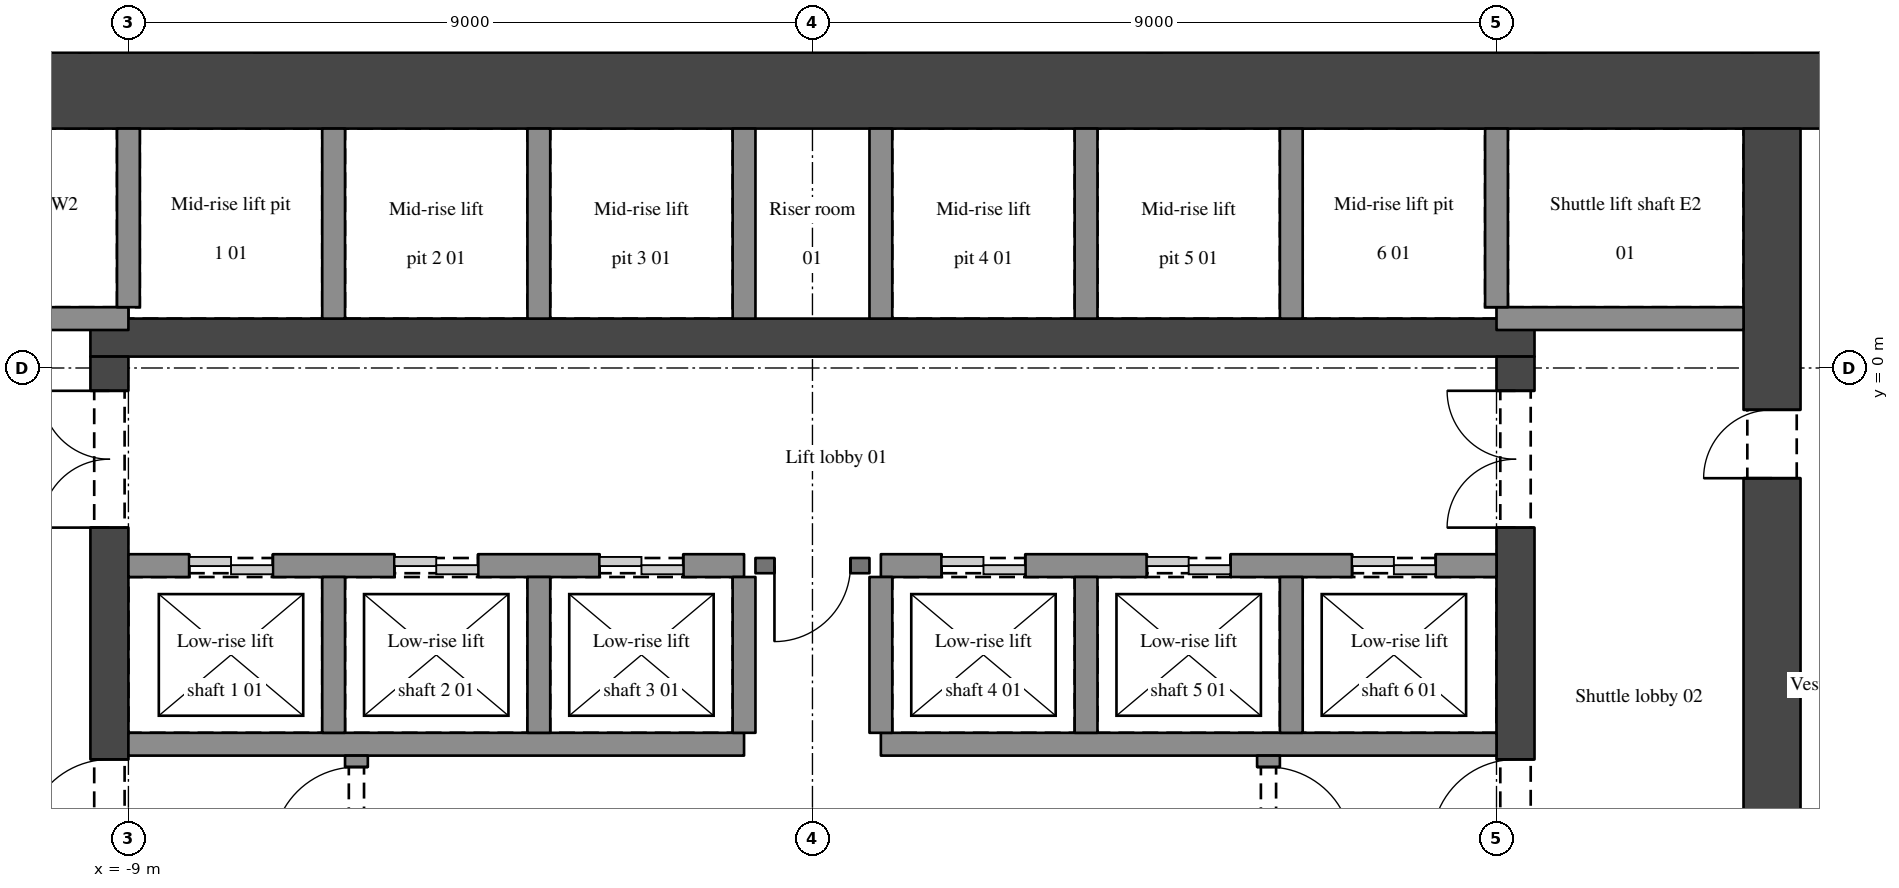
"""IFC4 building model, lengths in metres.
Left out: names, types, materials, properties, quantities, classifications, styles, units other than length and angle.
Written with IfcOpenShell. Run it as: python <this file> out.ifc"""

import sys

from ifc_helpers import new_model, si_unit, direction, frame, frame_2d, origin, place, context, subcontext, project, spatial, rectangle, extrude, element, fill, save


model = new_model("IFC4")
c1 = context("Model", 3, precision=1e-05, world=origin(), true_north=direction((0.0, 1.0)))
c2 = subcontext(c1, "Body", "Model", "MODEL_VIEW")
j1 = project(units=[si_unit("LENGTHUNIT", "METRE"), si_unit("PLANEANGLEUNIT", "RADIAN")], contexts=[c1])
p1 = place(None, origin())
s1 = spatial("IfcSite", under=j1, at=p1, CompositionType="ELEMENT")
p2 = place(p1, origin())
s2 = spatial("IfcBuilding", under=s1, at=p2, CompositionType="ELEMENT")
p3 = place(p2, frame((0.0, 0.0, 105.0)))
s3 = spatial("IfcBuildingStorey", under=s2, at=p3, CompositionType="ELEMENT", Elevation=105.0)
p4 = place(p3, frame((-15.0, 3.65, 0.0), z_axis=(0.0, 0.0, 1.0), x_axis=(1.0, 0.0, 0.0)))
e1 = element("IfcWall", 1, at=p4, inside=s3, PredefinedType="SHEAR", context=c2, shape_type="SweptSolid", body=[
    extrude(rectangle(XDim=30.0, YDim=1.0, at=frame_2d((15.0, 0.0))), origin(), (0.0, 0.0, 1.0), 3.9),
])
p5 = place(p3, frame((12.625, -11.5, 0.0), z_axis=(0.0, 0.0, 1.0), x_axis=(0.0, 1.0, 0.0)))
e2 = element("IfcWall", 2, at=p5, inside=s3, PredefinedType="SHEAR", context=c2, shape_type="SweptSolid", body=[
    extrude(rectangle(XDim=14.65, YDim=0.75, at=frame_2d((7.325, 0.0))), origin(), (0.0, 0.0, 1.0), 3.9),
])
p6 = place(p5, frame((10.05, 0.0, 0.0)))
e3 = element("IfcOpeningElement", 3, at=p6, cuts=e2, PredefinedType="OPENING", context=c2, shape_type="SweptSolid", body=[
    extrude(rectangle(XDim=0.9, YDim=2.1, at=frame_2d((0.45, 1.05))), frame((0.0, 0.385, 0.0), z_axis=(0.0, -1.0, 0.0), x_axis=(1.0, 0.0, 0.0)), (0.0, 0.0, 1.0), 0.77),
])
p7 = place(p3, frame((-9.5, 0.4, 0.0), z_axis=(0.0, 0.0, 1.0), x_axis=(1.0, 0.0, 0.0)))
e4 = element("IfcWall", 4, at=p7, inside=s3, PredefinedType="SHEAR", context=c2, shape_type="SweptSolid", body=[
    extrude(rectangle(XDim=19.0, YDim=0.5, at=frame_2d((9.5, 0.0))), origin(), (0.0, 0.0, 1.0), 3.9),
])
p8 = place(p3, frame((-9.25, -11.5, 0.0), z_axis=(0.0, 0.0, 1.0), x_axis=(0.0, 1.0, 0.0)))
e5 = element("IfcWall", 5, at=p8, inside=s3, PredefinedType="SHEAR", context=c2, shape_type="SweptSolid", body=[
    extrude(rectangle(XDim=11.65, YDim=0.5, at=frame_2d((5.825, 0.0))), origin(), (0.0, 0.0, 1.0), 3.9),
])
p9 = place(p8, frame((9.4, 0.0, 0.0)))
e6 = element("IfcOpeningElement", 6, at=p9, cuts=e5, PredefinedType="OPENING", context=c2, shape_type="SweptSolid", body=[
    extrude(rectangle(XDim=1.8, YDim=2.1, at=frame_2d((0.9, 1.05))), frame((0.0, 0.26, 0.0), z_axis=(0.0, -1.0, 0.0), x_axis=(1.0, 0.0, 0.0)), (0.0, 0.0, 1.0), 0.52),
])
p10 = place(p8, frame((5.25, 0.0, 0.0)))
e7 = element("IfcOpeningElement", 7, at=p10, cuts=e5, PredefinedType="OPENING", context=c2, shape_type="SweptSolid", body=[
    extrude(rectangle(XDim=1.1, YDim=2.1, at=frame_2d((0.55, 1.05))), frame((0.0, 0.26, 0.0), z_axis=(0.0, -1.0, 0.0), x_axis=(1.0, 0.0, 0.0)), (0.0, 0.0, 1.0), 0.52),
])
p11 = place(p3, frame((9.25, -11.5, 0.0), z_axis=(0.0, 0.0, 1.0), x_axis=(0.0, 1.0, 0.0)))
e8 = element("IfcWall", 8, at=p11, inside=s3, PredefinedType="SHEAR", context=c2, shape_type="SweptSolid", body=[
    extrude(rectangle(XDim=11.65, YDim=0.5, at=frame_2d((5.825, 0.0))), origin(), (0.0, 0.0, 1.0), 3.9),
])
p12 = place(p11, frame((9.4, 0.0, 0.0)))
e9 = element("IfcOpeningElement", 9, at=p12, cuts=e8, PredefinedType="OPENING", context=c2, shape_type="SweptSolid", body=[
    extrude(rectangle(XDim=1.8, YDim=2.1, at=frame_2d((0.9, 1.05))), frame((0.0, 0.26, 0.0), z_axis=(0.0, -1.0, 0.0), x_axis=(1.0, 0.0, 0.0)), (0.0, 0.0, 1.0), 0.52),
])
p13 = place(p11, frame((5.25, 0.0, 0.0)))
e10 = element("IfcOpeningElement", 10, at=p13, cuts=e8, PredefinedType="OPENING", context=c2, shape_type="SweptSolid", body=[
    extrude(rectangle(XDim=1.1, YDim=2.1, at=frame_2d((0.55, 1.05))), frame((0.0, 0.26, 0.0), z_axis=(0.0, -1.0, 0.0), x_axis=(1.0, 0.0, 0.0)), (0.0, 0.0, 1.0), 0.52),
])
for number, where, z_axis, x_axis in (
    (11, (-9.0, -4.95, 0.0), (0.0, 0.0, 1.0), (1.0, 0.0, 0.0)),
    (12, (0.9, -4.95, 0.0), (0.0, 0.0, 1.0), (1.0, 0.0, 0.0)),
):
    element("IfcWall", number, at=place(p3, frame(where, z_axis=z_axis, x_axis=x_axis)), inside=s3, PredefinedType="SHEAR", context=c2, shape_type="SweptSolid", body=[
        extrude(rectangle(XDim=8.1, YDim=0.3, at=frame_2d((4.05, 0.0))), origin(), (0.0, 0.0, 1.0), 3.9),
    ])
p14 = place(p3, frame((-9.0, -2.6, 0.0), z_axis=(0.0, 0.0, 1.0), x_axis=(1.0, 0.0, 0.0)))
e13 = element("IfcWall", 13, at=p14, inside=s3, PredefinedType="SHEAR", context=c2, shape_type="SweptSolid", body=[
    extrude(rectangle(XDim=8.1, YDim=0.3, at=frame_2d((4.05, 0.0))), origin(), (0.0, 0.0, 1.0), 3.9),
])
p15 = place(p14, frame((0.8, 0.0, 0.0)))
e14 = element("IfcOpeningElement", 14, at=p15, cuts=e13, PredefinedType="OPENING", context=c2, shape_type="SweptSolid", body=[
    extrude(rectangle(XDim=1.1, YDim=2.1, at=frame_2d((0.55, 1.05))), frame((0.0, 0.16, 0.0), z_axis=(0.0, -1.0, 0.0), x_axis=(1.0, 0.0, 0.0)), (0.0, 0.0, 1.0), 0.32),
])
p16 = place(p14, frame((3.5, 0.0, 0.0)))
e15 = element("IfcOpeningElement", 15, at=p16, cuts=e13, PredefinedType="OPENING", context=c2, shape_type="SweptSolid", body=[
    extrude(rectangle(XDim=1.1, YDim=2.1, at=frame_2d((0.55, 1.05))), frame((0.0, 0.16, 0.0), z_axis=(0.0, -1.0, 0.0), x_axis=(1.0, 0.0, 0.0)), (0.0, 0.0, 1.0), 0.32),
])
p17 = place(p14, frame((6.2, 0.0, 0.0)))
e16 = element("IfcOpeningElement", 16, at=p17, cuts=e13, PredefinedType="OPENING", context=c2, shape_type="SweptSolid", body=[
    extrude(rectangle(XDim=1.1, YDim=2.1, at=frame_2d((0.55, 1.05))), frame((0.0, 0.16, 0.0), z_axis=(0.0, -1.0, 0.0), x_axis=(1.0, 0.0, 0.0)), (0.0, 0.0, 1.0), 0.32),
])
p18 = place(p3, frame((0.75, -2.6, 0.0), z_axis=(0.0, 0.0, 1.0), x_axis=(-1.0, 0.0, 0.0)))
e17 = element("IfcWall", 17, at=p18, inside=s3, PredefinedType="SOLIDWALL", context=c2, shape_type="SweptSolid", body=[
    extrude(rectangle(XDim=1.5, YDim=0.2, at=frame_2d((0.75, 0.0))), origin(), (0.0, 0.0, 1.0), 3.6),
])
p19 = place(p18, frame((0.25, 0.0, 0.0)))
e18 = element("IfcOpeningElement", 18, at=p19, cuts=e17, PredefinedType="OPENING", context=c2, shape_type="SweptSolid", body=[
    extrude(rectangle(XDim=1.0, YDim=2.1, at=frame_2d((0.5, 1.05))), frame((0.0, 0.11, 0.0), z_axis=(0.0, -1.0, 0.0), x_axis=(1.0, 0.0, 0.0)), (0.0, 0.0, 1.0), 0.22),
])
p20 = place(p3, frame((0.9, -2.6, 0.0), z_axis=(0.0, 0.0, 1.0), x_axis=(1.0, 0.0, 0.0)))
e19 = element("IfcWall", 19, at=p20, inside=s3, PredefinedType="SHEAR", context=c2, shape_type="SweptSolid", body=[
    extrude(rectangle(XDim=8.1, YDim=0.3, at=frame_2d((4.05, 0.0))), origin(), (0.0, 0.0, 1.0), 3.9),
])
p21 = place(p20, frame((0.8, 0.0, 0.0)))
e20 = element("IfcOpeningElement", 20, at=p21, cuts=e19, PredefinedType="OPENING", context=c2, shape_type="SweptSolid", body=[
    extrude(rectangle(XDim=1.1, YDim=2.1, at=frame_2d((0.55, 1.05))), frame((0.0, 0.16, 0.0), z_axis=(0.0, -1.0, 0.0), x_axis=(1.0, 0.0, 0.0)), (0.0, 0.0, 1.0), 0.32),
])
p22 = place(p20, frame((3.5, 0.0, 0.0)))
e21 = element("IfcOpeningElement", 21, at=p22, cuts=e19, PredefinedType="OPENING", context=c2, shape_type="SweptSolid", body=[
    extrude(rectangle(XDim=1.1, YDim=2.1, at=frame_2d((0.55, 1.05))), frame((0.0, 0.16, 0.0), z_axis=(0.0, -1.0, 0.0), x_axis=(1.0, 0.0, 0.0)), (0.0, 0.0, 1.0), 0.32),
])
p23 = place(p20, frame((6.2, 0.0, 0.0)))
e22 = element("IfcOpeningElement", 22, at=p23, cuts=e19, PredefinedType="OPENING", context=c2, shape_type="SweptSolid", body=[
    extrude(rectangle(XDim=1.1, YDim=2.1, at=frame_2d((0.55, 1.05))), frame((0.0, 0.16, 0.0), z_axis=(0.0, -1.0, 0.0), x_axis=(1.0, 0.0, 0.0)), (0.0, 0.0, 1.0), 0.32),
])
for number, where, z_axis, x_axis in (
    (23, (-9.0, 0.65, 0.0), (0.0, 0.0, 1.0), (-1.0, 0.0, 0.0)),
    (24, (12.25, 0.65, 0.0), (0.0, 0.0, 1.0), (-1.0, 0.0, 0.0)),
):
    element("IfcWall", number, at=place(p3, frame(where, z_axis=z_axis, x_axis=x_axis)), inside=s3, PredefinedType="SHEAR", context=c2, shape_type="SweptSolid", body=[
        extrude(rectangle(XDim=3.25, YDim=0.3, at=frame_2d((1.625, 0.0))), origin(), (0.0, 0.0, 1.0), 3.9),
    ])
p24 = place(p3, frame((-9.575, 4.15, 0.0), z_axis=(0.0, 0.0, 1.0), x_axis=(0.0, 1.0, 0.0)))
e25 = element("IfcWall", 25, at=p24, inside=s3, PredefinedType="PARTITIONING", context=c2, shape_type="SweptSolid", body=[
    extrude(rectangle(XDim=5.38, YDim=0.15, at=frame_2d((2.69, 0.0))), origin(), (0.0, 0.0, 1.0), 2.96),
])
p25 = place(p3, frame((-9.0, 0.8, 0.0), z_axis=(0.0, 0.0, 1.0), x_axis=(0.0, 1.0, 0.0)))
e26 = element("IfcWall", 26, at=p25, inside=s3, PredefinedType="SHEAR", context=c2, shape_type="SweptSolid", body=[
    extrude(rectangle(XDim=2.35, YDim=0.3, at=frame_2d((1.175, 0.0))), origin(), (0.0, 0.0, 1.0), 3.9),
])
p26 = place(p3, frame((-6.3, -4.8, 0.0), z_axis=(0.0, 0.0, 1.0), x_axis=(0.0, 1.0, 0.0)))
e27 = element("IfcWall", 27, at=p26, inside=s3, PredefinedType="SHEAR", context=c2, shape_type="SweptSolid", body=[
    extrude(rectangle(XDim=2.05, YDim=0.3, at=frame_2d((1.025, 0.0))), origin(), (0.0, 0.0, 1.0), 3.9),
])
p27 = place(p3, frame((-6.3, 0.65, 0.0), z_axis=(0.0, 0.0, 1.0), x_axis=(0.0, 1.0, 0.0)))
e28 = element("IfcWall", 28, at=p27, inside=s3, PredefinedType="SHEAR", context=c2, shape_type="SweptSolid", body=[
    extrude(rectangle(XDim=2.5, YDim=0.3, at=frame_2d((1.25, 0.0))), origin(), (0.0, 0.0, 1.0), 3.9),
])
p28 = place(p3, frame((-6.0, -11.5, 0.0), z_axis=(0.0, 0.0, 1.0), x_axis=(0.0, 1.0, 0.0)))
e29 = element("IfcWall", 29, at=p28, inside=s3, PredefinedType="SHEAR", context=c2, shape_type="SweptSolid", body=[
    extrude(rectangle(XDim=6.4, YDim=0.3, at=frame_2d((3.2, 0.0))), origin(), (0.0, 0.0, 1.0), 3.9),
])
p29 = place(p28, frame((5.15, 0.0, 0.0)))
e30 = element("IfcOpeningElement", 30, at=p29, cuts=e29, PredefinedType="OPENING", context=c2, shape_type="SweptSolid", body=[
    extrude(rectangle(XDim=1.1, YDim=2.1, at=frame_2d((0.55, 1.05))), frame((0.0, 0.16, 0.0), z_axis=(0.0, -1.0, 0.0), x_axis=(1.0, 0.0, 0.0)), (0.0, 0.0, 1.0), 0.32),
])
p30 = place(p3, frame((-3.6, -4.8, 0.0), z_axis=(0.0, 0.0, 1.0), x_axis=(0.0, 1.0, 0.0)))
e31 = element("IfcWall", 31, at=p30, inside=s3, PredefinedType="SHEAR", context=c2, shape_type="SweptSolid", body=[
    extrude(rectangle(XDim=2.05, YDim=0.3, at=frame_2d((1.025, 0.0))), origin(), (0.0, 0.0, 1.0), 3.9),
])
p31 = place(p3, frame((-3.6, 0.65, 0.0), z_axis=(0.0, 0.0, 1.0), x_axis=(0.0, 1.0, 0.0)))
e32 = element("IfcWall", 32, at=p31, inside=s3, PredefinedType="SHEAR", context=c2, shape_type="SweptSolid", body=[
    extrude(rectangle(XDim=2.5, YDim=0.3, at=frame_2d((1.25, 0.0))), origin(), (0.0, 0.0, 1.0), 3.9),
])
p32 = place(p3, frame((-0.9, -4.8, 0.0), z_axis=(0.0, 0.0, 1.0), x_axis=(0.0, 1.0, 0.0)))
e33 = element("IfcWall", 33, at=p32, inside=s3, PredefinedType="SHEAR", context=c2, shape_type="SweptSolid", body=[
    extrude(rectangle(XDim=2.05, YDim=0.3, at=frame_2d((1.025, 0.0))), origin(), (0.0, 0.0, 1.0), 3.9),
])
p33 = place(p3, frame((-0.9, 0.65, 0.0), z_axis=(0.0, 0.0, 1.0), x_axis=(0.0, 1.0, 0.0)))
e34 = element("IfcWall", 34, at=p33, inside=s3, PredefinedType="SHEAR", context=c2, shape_type="SweptSolid", body=[
    extrude(rectangle(XDim=2.5, YDim=0.3, at=frame_2d((1.25, 0.0))), origin(), (0.0, 0.0, 1.0), 3.9),
])
p34 = place(p3, frame((0.9, -4.8, 0.0), z_axis=(0.0, 0.0, 1.0), x_axis=(0.0, 1.0, 0.0)))
e35 = element("IfcWall", 35, at=p34, inside=s3, PredefinedType="SHEAR", context=c2, shape_type="SweptSolid", body=[
    extrude(rectangle(XDim=2.05, YDim=0.3, at=frame_2d((1.025, 0.0))), origin(), (0.0, 0.0, 1.0), 3.9),
])
p35 = place(p3, frame((0.9, 0.65, 0.0), z_axis=(0.0, 0.0, 1.0), x_axis=(0.0, 1.0, 0.0)))
e36 = element("IfcWall", 36, at=p35, inside=s3, PredefinedType="SHEAR", context=c2, shape_type="SweptSolid", body=[
    extrude(rectangle(XDim=2.5, YDim=0.3, at=frame_2d((1.25, 0.0))), origin(), (0.0, 0.0, 1.0), 3.9),
])
p36 = place(p3, frame((3.6, -4.8, 0.0), z_axis=(0.0, 0.0, 1.0), x_axis=(0.0, 1.0, 0.0)))
e37 = element("IfcWall", 37, at=p36, inside=s3, PredefinedType="SHEAR", context=c2, shape_type="SweptSolid", body=[
    extrude(rectangle(XDim=2.05, YDim=0.3, at=frame_2d((1.025, 0.0))), origin(), (0.0, 0.0, 1.0), 3.9),
])
p37 = place(p3, frame((3.6, 0.65, 0.0), z_axis=(0.0, 0.0, 1.0), x_axis=(0.0, 1.0, 0.0)))
e38 = element("IfcWall", 38, at=p37, inside=s3, PredefinedType="SHEAR", context=c2, shape_type="SweptSolid", body=[
    extrude(rectangle(XDim=2.5, YDim=0.3, at=frame_2d((1.25, 0.0))), origin(), (0.0, 0.0, 1.0), 3.9),
])
p38 = place(p3, frame((6.0, -5.1, 0.0), z_axis=(0.0, 0.0, 1.0), x_axis=(0.0, -1.0, 0.0)))
e39 = element("IfcWall", 39, at=p38, inside=s3, PredefinedType="SHEAR", context=c2, shape_type="SweptSolid", body=[
    extrude(rectangle(XDim=6.4, YDim=0.3, at=frame_2d((3.2, 0.0))), origin(), (0.0, 0.0, 1.0), 3.9),
])
p39 = place(p38, frame((0.15, 0.0, 0.0)))
e40 = element("IfcOpeningElement", 40, at=p39, cuts=e39, PredefinedType="OPENING", context=c2, shape_type="SweptSolid", body=[
    extrude(rectangle(XDim=1.1, YDim=2.1, at=frame_2d((0.55, 1.05))), frame((0.0, 0.16, 0.0), z_axis=(0.0, -1.0, 0.0), x_axis=(1.0, 0.0, 0.0)), (0.0, 0.0, 1.0), 0.32),
])
p40 = place(p3, frame((6.3, -4.8, 0.0), z_axis=(0.0, 0.0, 1.0), x_axis=(0.0, 1.0, 0.0)))
e41 = element("IfcWall", 41, at=p40, inside=s3, PredefinedType="SHEAR", context=c2, shape_type="SweptSolid", body=[
    extrude(rectangle(XDim=2.05, YDim=0.3, at=frame_2d((1.025, 0.0))), origin(), (0.0, 0.0, 1.0), 3.9),
])
p41 = place(p3, frame((6.3, 0.65, 0.0), z_axis=(0.0, 0.0, 1.0), x_axis=(0.0, 1.0, 0.0)))
e42 = element("IfcWall", 42, at=p41, inside=s3, PredefinedType="SHEAR", context=c2, shape_type="SweptSolid", body=[
    extrude(rectangle(XDim=2.5, YDim=0.3, at=frame_2d((1.25, 0.0))), origin(), (0.0, 0.0, 1.0), 3.9),
])
p42 = place(p3, frame((9.0, 0.8, 0.0), z_axis=(0.0, 0.0, 1.0), x_axis=(0.0, 1.0, 0.0)))
e43 = element("IfcWall", 43, at=p42, inside=s3, PredefinedType="SHEAR", context=c2, shape_type="SweptSolid", body=[
    extrude(rectangle(XDim=2.35, YDim=0.3, at=frame_2d((1.175, 0.0))), origin(), (0.0, 0.0, 1.0), 3.9),
])
for number, where, z_axis, x_axis in (
    (44, (9.575, 4.15, 0.0), (0.0, 0.0, 1.0), (0.0, 1.0, 0.0)),
    (45, (12.3, 4.15, 0.0), (0.0, 0.0, 1.0), (0.0, 1.0, 0.0)),
):
    element("IfcWall", number, at=place(p3, frame(where, z_axis=z_axis, x_axis=x_axis)), inside=s3, PredefinedType="PARTITIONING", context=c2, shape_type="SweptSolid", body=[
        extrude(rectangle(XDim=5.38, YDim=0.15, at=frame_2d((2.69, 0.0))), origin(), (0.0, 0.0, 1.0), 2.96),
    ])
p43 = place(p12, origin())
e46 = element("IfcDoor", 46, at=p43, inside=s3, OperationType="DOUBLE_DOOR_SINGLE_SWING", PredefinedType="DOOR", context=c2, shape_type="SweptSolid", body=[
    extrude(rectangle(XDim=1.8, YDim=2.1, at=frame_2d((0.9, 1.05))), frame((0.0, 0.025, 0.0), z_axis=(0.0, -1.0, 0.0), x_axis=(1.0, 0.0, 0.0)), (0.0, 0.0, 1.0), 0.05),
])
fill(e9, e46)
p44 = place(p9, origin())
e47 = element("IfcDoor", 47, at=p44, inside=s3, OperationType="DOUBLE_DOOR_SINGLE_SWING", PredefinedType="DOOR", context=c2, shape_type="SweptSolid", body=[
    extrude(rectangle(XDim=1.8, YDim=2.1, at=frame_2d((0.9, 1.05))), frame((0.0, 0.025, 0.0), z_axis=(0.0, -1.0, 0.0), x_axis=(1.0, 0.0, 0.0)), (0.0, 0.0, 1.0), 0.05),
])
fill(e6, e47)
p45 = place(p19, origin())
e48 = element("IfcDoor", 48, at=p45, inside=s3, OperationType="SINGLE_SWING_RIGHT", PredefinedType="DOOR", context=c2, shape_type="SweptSolid", body=[
    extrude(rectangle(XDim=1.0, YDim=2.1, at=frame_2d((0.5, 1.05))), frame((0.0, 0.025, 0.0), z_axis=(0.0, -1.0, 0.0), x_axis=(1.0, 0.0, 0.0)), (0.0, 0.0, 1.0), 0.05),
])
fill(e18, e48)
p46 = place(p29, origin())
e49 = element("IfcDoor", 49, at=p46, inside=s3, OperationType="SINGLE_SWING_LEFT", PredefinedType="DOOR", context=c2, shape_type="SweptSolid", body=[
    extrude(rectangle(XDim=1.1, YDim=2.1, at=frame_2d((0.55, 1.05))), frame((0.0, 0.025, 0.0), z_axis=(0.0, -1.0, 0.0), x_axis=(1.0, 0.0, 0.0)), (0.0, 0.0, 1.0), 0.05),
])
fill(e30, e49)
p47 = place(p10, origin())
e50 = element("IfcDoor", 50, at=p47, inside=s3, OperationType="SINGLE_SWING_LEFT", PredefinedType="DOOR", context=c2, shape_type="SweptSolid", body=[
    extrude(rectangle(XDim=1.1, YDim=2.1, at=frame_2d((0.55, 1.05))), frame((0.0, 0.025, 0.0), z_axis=(0.0, -1.0, 0.0), x_axis=(1.0, 0.0, 0.0)), (0.0, 0.0, 1.0), 0.05),
])
fill(e7, e50)
p48 = place(p39, origin())
e51 = element("IfcDoor", 51, at=p48, inside=s3, OperationType="SINGLE_SWING_RIGHT", PredefinedType="DOOR", context=c2, shape_type="SweptSolid", body=[
    extrude(rectangle(XDim=1.1, YDim=2.1, at=frame_2d((0.55, 1.05))), frame((0.0, 0.025, 0.0), z_axis=(0.0, -1.0, 0.0), x_axis=(1.0, 0.0, 0.0)), (0.0, 0.0, 1.0), 0.05),
])
fill(e40, e51)
p49 = place(p13, origin())
e52 = element("IfcDoor", 52, at=p49, inside=s3, OperationType="SINGLE_SWING_LEFT", PredefinedType="DOOR", context=c2, shape_type="SweptSolid", body=[
    extrude(rectangle(XDim=1.1, YDim=2.1, at=frame_2d((0.55, 1.05))), frame((0.0, 0.025, 0.0), z_axis=(0.0, -1.0, 0.0), x_axis=(1.0, 0.0, 0.0)), (0.0, 0.0, 1.0), 0.05),
])
fill(e10, e52)
p50 = place(p6, origin())
e53 = element("IfcDoor", 53, at=p50, inside=s3, OperationType="SINGLE_SWING_LEFT", PredefinedType="DOOR", context=c2, shape_type="SweptSolid", body=[
    extrude(rectangle(XDim=0.9, YDim=2.1, at=frame_2d((0.45, 1.05))), frame((0.0, 0.025, 0.0), z_axis=(0.0, -1.0, 0.0), x_axis=(1.0, 0.0, 0.0)), (0.0, 0.0, 1.0), 0.05),
])
fill(e3, e53)
p51 = place(p15, origin())
e54 = element("IfcDoor", 54, at=p51, inside=s3, OperationType="DOUBLE_DOOR_SLIDING", PredefinedType="DOOR", context=c2, shape_type="SweptSolid", body=[
    extrude(rectangle(XDim=1.1, YDim=2.1, at=frame_2d((0.55, 1.05))), frame((0.0, 0.025, 0.0), z_axis=(0.0, -1.0, 0.0), x_axis=(1.0, 0.0, 0.0)), (0.0, 0.0, 1.0), 0.05),
])
fill(e14, e54)
p52 = place(p16, origin())
e55 = element("IfcDoor", 55, at=p52, inside=s3, OperationType="DOUBLE_DOOR_SLIDING", PredefinedType="DOOR", context=c2, shape_type="SweptSolid", body=[
    extrude(rectangle(XDim=1.1, YDim=2.1, at=frame_2d((0.55, 1.05))), frame((0.0, 0.025, 0.0), z_axis=(0.0, -1.0, 0.0), x_axis=(1.0, 0.0, 0.0)), (0.0, 0.0, 1.0), 0.05),
])
fill(e15, e55)
p53 = place(p17, origin())
e56 = element("IfcDoor", 56, at=p53, inside=s3, OperationType="DOUBLE_DOOR_SLIDING", PredefinedType="DOOR", context=c2, shape_type="SweptSolid", body=[
    extrude(rectangle(XDim=1.1, YDim=2.1, at=frame_2d((0.55, 1.05))), frame((0.0, 0.025, 0.0), z_axis=(0.0, -1.0, 0.0), x_axis=(1.0, 0.0, 0.0)), (0.0, 0.0, 1.0), 0.05),
])
fill(e16, e56)
p54 = place(p21, origin())
e57 = element("IfcDoor", 57, at=p54, inside=s3, OperationType="DOUBLE_DOOR_SLIDING", PredefinedType="DOOR", context=c2, shape_type="SweptSolid", body=[
    extrude(rectangle(XDim=1.1, YDim=2.1, at=frame_2d((0.55, 1.05))), frame((0.0, 0.025, 0.0), z_axis=(0.0, -1.0, 0.0), x_axis=(1.0, 0.0, 0.0)), (0.0, 0.0, 1.0), 0.05),
])
fill(e20, e57)
p55 = place(p22, origin())
e58 = element("IfcDoor", 58, at=p55, inside=s3, OperationType="DOUBLE_DOOR_SLIDING", PredefinedType="DOOR", context=c2, shape_type="SweptSolid", body=[
    extrude(rectangle(XDim=1.1, YDim=2.1, at=frame_2d((0.55, 1.05))), frame((0.0, 0.025, 0.0), z_axis=(0.0, -1.0, 0.0), x_axis=(1.0, 0.0, 0.0)), (0.0, 0.0, 1.0), 0.05),
])
fill(e21, e58)
p56 = place(p23, origin())
e59 = element("IfcDoor", 59, at=p56, inside=s3, OperationType="DOUBLE_DOOR_SLIDING", PredefinedType="DOOR", context=c2, shape_type="SweptSolid", body=[
    extrude(rectangle(XDim=1.1, YDim=2.1, at=frame_2d((0.55, 1.05))), frame((0.0, 0.025, 0.0), z_axis=(0.0, -1.0, 0.0), x_axis=(1.0, 0.0, 0.0)), (0.0, 0.0, 1.0), 0.05),
])
fill(e22, e59)
save(model, sys.argv[1])
